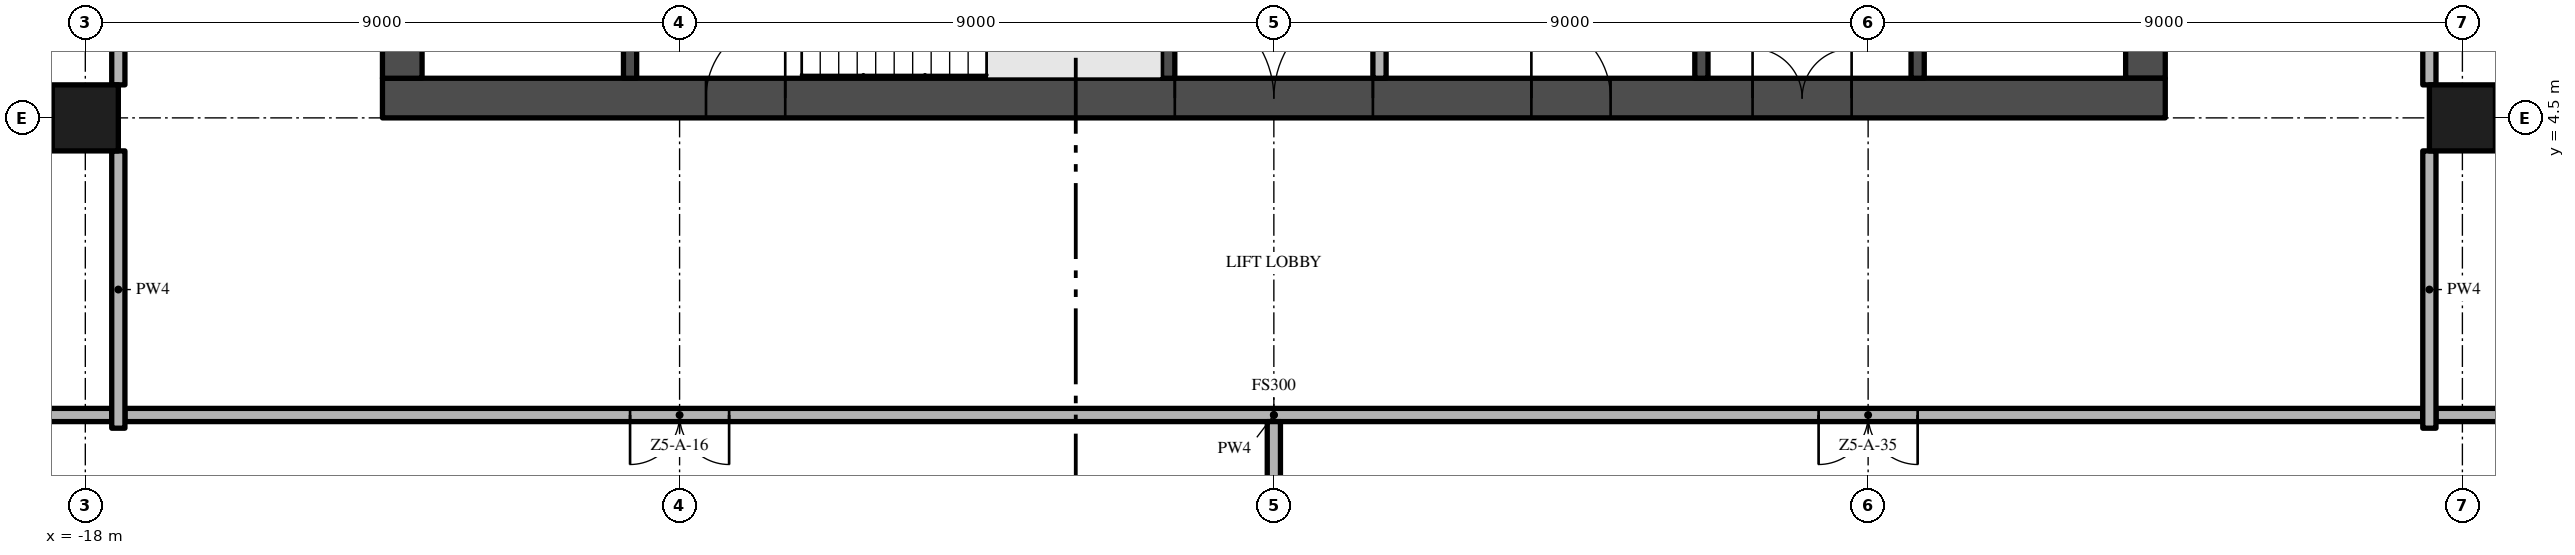
"""IFC4 building model, lengths in metres.
Left out: names, types, materials, properties, quantities, classifications, styles, units other than length and angle.
Written with IfcOpenShell. Run it as: python <this file> out.ifc"""

import sys

from ifc_helpers import new_model, si_unit, direction, frame, frame_2d, origin, origin_2d, place, context, subcontext, project, spatial, rectangle, extrude, element, fill, save


model = new_model("IFC4")
c1 = context("Model", 3, precision=1e-05, world=origin(), true_north=direction((0.0, 1.0)))
c2 = subcontext(c1, "Body", "Model", "MODEL_VIEW")
j1 = project(units=[si_unit("LENGTHUNIT", "METRE"), si_unit("PLANEANGLEUNIT", "RADIAN")], contexts=[c1])
p1 = place(None, origin())
s1 = spatial("IfcSite", under=j1, at=p1, CompositionType="ELEMENT")
p2 = place(p1, origin())
s2 = spatial("IfcBuilding", under=s1, at=p2, CompositionType="ELEMENT")
p3 = place(p2, frame((0.0, 0.0, 238.8)))
s3 = spatial("IfcBuildingStorey", under=s2, at=p3, CompositionType="ELEMENT", Elevation=238.8)
p4 = place(p3, frame((-13.5, 4.8, -0.3), z_axis=(0.0, 0.0, 1.0), x_axis=(1.0, 0.0, 0.0)))
e1 = element("IfcWall", 1, at=p4, inside=s3, PredefinedType="SHEAR", context=c2, shape_type="SweptSolid", body=[
    extrude(rectangle(XDim=27.0, YDim=0.6, at=frame_2d((13.5, 0.0))), origin(), (0.0, 0.0, 1.0), 3.8),
])
p5 = place(p4, frame((12.0, 0.0, 0.3)))
e2 = element("IfcOpeningElement", 2, at=p5, cuts=e1, PredefinedType="OPENING", context=c2, shape_type="SweptSolid", body=[
    extrude(rectangle(XDim=3.0, YDim=2.4, at=frame_2d((1.5, 1.2))), frame((0.0, 0.31, 0.0), z_axis=(0.0, -1.0, 0.0), x_axis=(1.0, 0.0, 0.0)), (0.0, 0.0, 1.0), 0.62),
])
p6 = place(p4, frame((4.9, 0.0, 0.3)))
e3 = element("IfcOpeningElement", 3, at=p6, cuts=e1, PredefinedType="OPENING", context=c2, shape_type="SweptSolid", body=[
    extrude(rectangle(XDim=1.2, YDim=2.2, at=frame_2d((0.6, 1.1))), frame((0.0, 0.31, 0.0), z_axis=(0.0, -1.0, 0.0), x_axis=(1.0, 0.0, 0.0)), (0.0, 0.0, 1.0), 0.62),
])
p7 = place(p4, frame((20.75, 0.0, 0.3)))
e4 = element("IfcOpeningElement", 4, at=p7, cuts=e1, PredefinedType="OPENING", context=c2, shape_type="SweptSolid", body=[
    extrude(rectangle(XDim=1.5, YDim=2.2, at=frame_2d((0.75, 1.1))), frame((0.0, 0.31, 0.0), z_axis=(0.0, -1.0, 0.0), x_axis=(1.0, 0.0, 0.0)), (0.0, 0.0, 1.0), 0.62),
])
p8 = place(p4, frame((17.4, 0.0, 0.3)))
e5 = element("IfcOpeningElement", 5, at=p8, cuts=e1, PredefinedType="OPENING", context=c2, shape_type="SweptSolid", body=[
    extrude(rectangle(XDim=1.2, YDim=2.2, at=frame_2d((0.6, 1.1))), frame((0.0, 0.31, 0.0), z_axis=(0.0, -1.0, 0.0), x_axis=(1.0, 0.0, 0.0)), (0.0, 0.0, 1.0), 0.62),
])
p9 = place(p3, frame((13.2, 5.1, -0.3), z_axis=(0.0, 0.0, 1.0), x_axis=(0.0, 1.0, 0.0)))
e6 = element("IfcWall", 6, at=p9, inside=s3, PredefinedType="SHEAR", context=c2, shape_type="SweptSolid", body=[
    extrude(rectangle(XDim=16.8, YDim=0.6, at=frame_2d((8.4, 0.0))), origin(), (0.0, 0.0, 1.0), 3.8),
])
p10 = place(p9, frame((6.3, 0.0, 0.3)))
e7 = element("IfcOpeningElement", 7, at=p10, cuts=e6, PredefinedType="OPENING", context=c2, shape_type="SweptSolid", body=[
    extrude(rectangle(XDim=1.2, YDim=2.2, at=frame_2d((0.6, 1.1))), frame((0.0, 0.31, 0.0), z_axis=(0.0, -1.0, 0.0), x_axis=(1.0, 0.0, 0.0)), (0.0, 0.0, 1.0), 0.62),
])
p11 = place(p3, frame((-13.2, 21.9, -0.3), z_axis=(0.0, 0.0, 1.0), x_axis=(0.0, -1.0, 0.0)))
e8 = element("IfcWall", 8, at=p11, inside=s3, PredefinedType="SHEAR", context=c2, shape_type="SweptSolid", body=[
    extrude(rectangle(XDim=16.8, YDim=0.6, at=frame_2d((8.4, 0.0))), origin(), (0.0, 0.0, 1.0), 3.8),
])
p12 = place(p11, frame((9.3, 0.0, 0.3)))
e9 = element("IfcOpeningElement", 9, at=p12, cuts=e8, PredefinedType="OPENING", context=c2, shape_type="SweptSolid", body=[
    extrude(rectangle(XDim=1.2, YDim=2.2, at=frame_2d((0.6, 1.1))), frame((0.0, 0.31, 0.0), z_axis=(0.0, -1.0, 0.0), x_axis=(1.0, 0.0, 0.0)), (0.0, 0.0, 1.0), 0.62),
])
for number, where, z_axis, x_axis in (
    (10, (-18.0, 4.5, 0.0), (0.0, 0.0, 1.0), (1.0, 0.0, 0.0)),
    (11, (18.0, 4.5, 0.0), (0.0, 0.0, 1.0), (1.0, 0.0, 0.0)),
):
    element("IfcColumn", number, at=place(p3, frame(where, z_axis=z_axis, x_axis=x_axis)), inside=s3, PredefinedType="COLUMN", context=c2, shape_type="SweptSolid", body=[
        extrude(rectangle(XDim=1.0, YDim=1.0, at=origin_2d()), origin(), (0.0, 0.0, 1.0), 3.5),
    ])
for number, where, z_axis, x_axis in (
    (12, (-9.75, 5.1, 0.0), (0.0, 0.0, 1.0), (0.0, 1.0, 0.0)),
    (13, (-1.6, 5.1, 0.0), (0.0, 0.0, 1.0), (0.0, 1.0, 0.0)),
):
    element("IfcWall", number, at=place(p3, frame(where, z_axis=z_axis, x_axis=x_axis)), inside=s3, PredefinedType="SHEAR", context=c2, shape_type="SweptSolid", body=[
        extrude(rectangle(XDim=2.85, YDim=0.2, at=frame_2d((1.425, 0.0))), origin(), (0.0, 0.0, 1.0), 3.5),
    ])
p13 = place(p3, frame((1.6, 7.5, 0.0), z_axis=(0.0, 0.0, 1.0), x_axis=(0.0, -1.0, 0.0)))
e14 = element("IfcWall", 14, at=p13, inside=s3, PredefinedType="PARTITIONING", context=c2, shape_type="SweptSolid", body=[
    extrude(rectangle(XDim=2.4, YDim=0.2, at=frame_2d((1.2, 0.0))), origin(), (0.0, 0.0, 1.0), 3.5),
])
p14 = place(p13, frame((0.35, 0.0, 0.0)))
e15 = element("IfcOpeningElement", 15, at=p14, cuts=e14, PredefinedType="OPENING", context=c2, shape_type="SweptSolid", body=[
    extrude(rectangle(XDim=0.9, YDim=2.1, at=frame_2d((0.45, 1.05))), frame((0.0, 0.11, 0.0), z_axis=(0.0, -1.0, 0.0), x_axis=(1.0, 0.0, 0.0)), (0.0, 0.0, 1.0), 0.22),
])
p15 = place(p3, frame((6.475, 5.1, 0.0), z_axis=(0.0, 0.0, 1.0), x_axis=(0.0, 1.0, 0.0)))
e16 = element("IfcWall", 16, at=p15, inside=s3, PredefinedType="SHEAR", context=c2, shape_type="SweptSolid", body=[
    extrude(rectangle(XDim=2.4, YDim=0.2, at=frame_2d((1.2, 0.0))), origin(), (0.0, 0.0, 1.0), 3.5),
])
p16 = place(p3, frame((9.75, 5.1, 0.0), z_axis=(0.0, 0.0, 1.0), x_axis=(0.0, 1.0, 0.0)))
e17 = element("IfcWall", 17, at=p16, inside=s3, PredefinedType="SHEAR", context=c2, shape_type="SweptSolid", body=[
    extrude(rectangle(XDim=2.5, YDim=0.2, at=frame_2d((1.25, 0.0))), origin(), (0.0, 0.0, 1.0), 3.5),
])
p17 = place(p16, frame((0.85, 0.0, 0.0)))
e18 = element("IfcOpeningElement", 18, at=p17, cuts=e17, PredefinedType="OPENING", context=c2, shape_type="SweptSolid", body=[
    extrude(rectangle(XDim=1.1, YDim=2.1, at=frame_2d((0.55, 1.05))), frame((0.0, 0.11, 0.0), z_axis=(0.0, -1.0, 0.0), x_axis=(1.0, 0.0, 0.0)), (0.0, 0.0, 1.0), 0.22),
])
p18 = place(p3, frame((17.4, 0.0, 0.0), z_axis=(0.0, 0.0, 1.0), x_axis=(-1.0, 0.0, 0.0)))
e19 = element("IfcWall", 19, at=p18, inside=s3, PredefinedType="PARTITIONING", context=c2, shape_type="SweptSolid", body=[
    extrude(rectangle(XDim=34.8, YDim=0.2, at=frame_2d((17.4, 0.0))), origin(), (0.0, 0.0, 1.0), 3.5),
])
p19 = place(p18, frame((25.65, 0.0, 0.0)))
e20 = element("IfcOpeningElement", 20, at=p19, cuts=e19, PredefinedType="OPENING", context=c2, shape_type="SweptSolid", body=[
    extrude(rectangle(XDim=1.5, YDim=2.4, at=frame_2d((0.75, 1.2))), frame((0.0, 0.11, 0.0), z_axis=(0.0, -1.0, 0.0), x_axis=(1.0, 0.0, 0.0)), (0.0, 0.0, 1.0), 0.22),
])
p20 = place(p18, frame((7.65, 0.0, 0.0)))
e21 = element("IfcOpeningElement", 21, at=p20, cuts=e19, PredefinedType="OPENING", context=c2, shape_type="SweptSolid", body=[
    extrude(rectangle(XDim=1.5, YDim=2.4, at=frame_2d((0.75, 1.2))), frame((0.0, 0.11, 0.0), z_axis=(0.0, -1.0, 0.0), x_axis=(1.0, 0.0, 0.0)), (0.0, 0.0, 1.0), 0.22),
])
for number, where, z_axis, x_axis in (
    (22, (-26.7, 0.0, 0.0), (0.0, 0.0, 1.0), (1.0, 0.0, 0.0)),
    (23, (17.6, 0.0, 0.0), (0.0, 0.0, 1.0), (1.0, 0.0, 0.0)),
):
    element("IfcWall", number, at=place(p3, frame(where, z_axis=z_axis, x_axis=x_axis)), inside=s3, PredefinedType="PARTITIONING", context=c2, shape_type="SweptSolid", body=[
        extrude(rectangle(XDim=9.1, YDim=0.2, at=frame_2d((4.55, 0.0))), origin(), (0.0, 0.0, 1.0), 3.5),
    ])
p21 = place(p3, frame((-17.5, -0.2, 0.0), z_axis=(0.0, 0.0, 1.0), x_axis=(0.0, 1.0, 0.0)))
e24 = element("IfcWall", 24, at=p21, inside=s3, PredefinedType="PARTITIONING", context=c2, shape_type="SweptSolid", body=[
    extrude(rectangle(XDim=4.2, YDim=0.2, at=frame_2d((2.1, 0.0))), origin(), (0.0, 0.0, 1.0), 3.5),
])
p22 = place(p3, frame((-17.5, 5.0, 0.0), z_axis=(0.0, 0.0, 1.0), x_axis=(0.0, 1.0, 0.0)))
e25 = element("IfcWall", 25, at=p22, inside=s3, PredefinedType="PARTITIONING", context=c2, shape_type="SweptSolid", body=[
    extrude(rectangle(XDim=8.0, YDim=0.2, at=frame_2d((4.0, 0.0))), origin(), (0.0, 0.0, 1.0), 3.5),
])
p23 = place(p3, frame((0.0, -4.0, 0.0), z_axis=(0.0, 0.0, 1.0), x_axis=(0.0, 1.0, 0.0)))
e26 = element("IfcWall", 26, at=p23, inside=s3, PredefinedType="PARTITIONING", context=c2, shape_type="SweptSolid", body=[
    extrude(rectangle(XDim=3.9, YDim=0.2, at=frame_2d((1.95, 0.0))), origin(), (0.0, 0.0, 1.0), 3.5),
])
p24 = place(p3, frame((17.5, -0.2, 0.0), z_axis=(0.0, 0.0, 1.0), x_axis=(0.0, 1.0, 0.0)))
e27 = element("IfcWall", 27, at=p24, inside=s3, PredefinedType="PARTITIONING", context=c2, shape_type="SweptSolid", body=[
    extrude(rectangle(XDim=4.2, YDim=0.2, at=frame_2d((2.1, 0.0))), origin(), (0.0, 0.0, 1.0), 3.5),
])
p25 = place(p3, frame((17.5, 5.0, 0.0), z_axis=(0.0, 0.0, 1.0), x_axis=(0.0, 1.0, 0.0)))
e28 = element("IfcWall", 28, at=p25, inside=s3, PredefinedType="PARTITIONING", context=c2, shape_type="SweptSolid", body=[
    extrude(rectangle(XDim=8.0, YDim=0.2, at=frame_2d((4.0, 0.0))), origin(), (0.0, 0.0, 1.0), 3.5),
])
p26 = place(p5, frame((3.0, 0.0, 0.0), z_axis=(0.0, 0.0, 1.0), x_axis=(-1.0, 0.0, 0.0)))
e29 = element("IfcDoor", 29, at=p26, inside=s3, OperationType="DOUBLE_DOOR_SINGLE_SWING", PredefinedType="DOOR", context=c2, shape_type="SweptSolid", body=[
    extrude(rectangle(XDim=3.0, YDim=2.4, at=frame_2d((1.5, 1.2))), frame((0.0, 0.025, 0.0), z_axis=(0.0, -1.0, 0.0), x_axis=(1.0, 0.0, 0.0)), (0.0, 0.0, 1.0), 0.05),
])
fill(e2, e29)
p27 = place(p6, frame((1.2, 0.0, 0.0), z_axis=(0.0, 0.0, 1.0), x_axis=(-1.0, 0.0, 0.0)))
e30 = element("IfcDoor", 30, at=p27, inside=s3, OperationType="SINGLE_SWING_LEFT", PredefinedType="DOOR", context=c2, shape_type="SweptSolid", body=[
    extrude(rectangle(XDim=1.2, YDim=2.2, at=frame_2d((0.6, 1.1))), frame((0.0, 0.025, 0.0), z_axis=(0.0, -1.0, 0.0), x_axis=(1.0, 0.0, 0.0)), (0.0, 0.0, 1.0), 0.05),
])
fill(e3, e30)
p28 = place(p7, frame((1.5, 0.0, 0.0), z_axis=(0.0, 0.0, 1.0), x_axis=(-1.0, 0.0, 0.0)))
e31 = element("IfcDoor", 31, at=p28, inside=s3, OperationType="DOUBLE_DOOR_SINGLE_SWING", PredefinedType="DOOR", context=c2, shape_type="SweptSolid", body=[
    extrude(rectangle(XDim=1.5, YDim=2.2, at=frame_2d((0.75, 1.1))), frame((0.0, 0.025, 0.0), z_axis=(0.0, -1.0, 0.0), x_axis=(1.0, 0.0, 0.0)), (0.0, 0.0, 1.0), 0.05),
])
fill(e4, e31)
p29 = place(p8, frame((1.2, 0.0, 0.0), z_axis=(0.0, 0.0, 1.0), x_axis=(-1.0, 0.0, 0.0)))
e32 = element("IfcDoor", 32, at=p29, inside=s3, OperationType="SINGLE_SWING_RIGHT", PredefinedType="DOOR", context=c2, shape_type="SweptSolid", body=[
    extrude(rectangle(XDim=1.2, YDim=2.2, at=frame_2d((0.6, 1.1))), frame((0.0, 0.025, 0.0), z_axis=(0.0, -1.0, 0.0), x_axis=(1.0, 0.0, 0.0)), (0.0, 0.0, 1.0), 0.05),
])
fill(e5, e32)
p30 = place(p19, origin())
e33 = element("IfcDoor", 33, at=p30, inside=s3, OperationType="DOUBLE_DOOR_SINGLE_SWING", PredefinedType="DOOR", context=c2, shape_type="SweptSolid", body=[
    extrude(rectangle(XDim=1.5, YDim=2.4, at=frame_2d((0.75, 1.2))), frame((0.0, 0.025, 0.0), z_axis=(0.0, -1.0, 0.0), x_axis=(1.0, 0.0, 0.0)), (0.0, 0.0, 1.0), 0.05),
])
fill(e20, e33)
p31 = place(p20, origin())
e34 = element("IfcDoor", 34, at=p31, inside=s3, OperationType="DOUBLE_DOOR_SINGLE_SWING", PredefinedType="DOOR", context=c2, shape_type="SweptSolid", body=[
    extrude(rectangle(XDim=1.5, YDim=2.4, at=frame_2d((0.75, 1.2))), frame((0.0, 0.025, 0.0), z_axis=(0.0, -1.0, 0.0), x_axis=(1.0, 0.0, 0.0)), (0.0, 0.0, 1.0), 0.05),
])
fill(e21, e34)
save(model, sys.argv[1])
